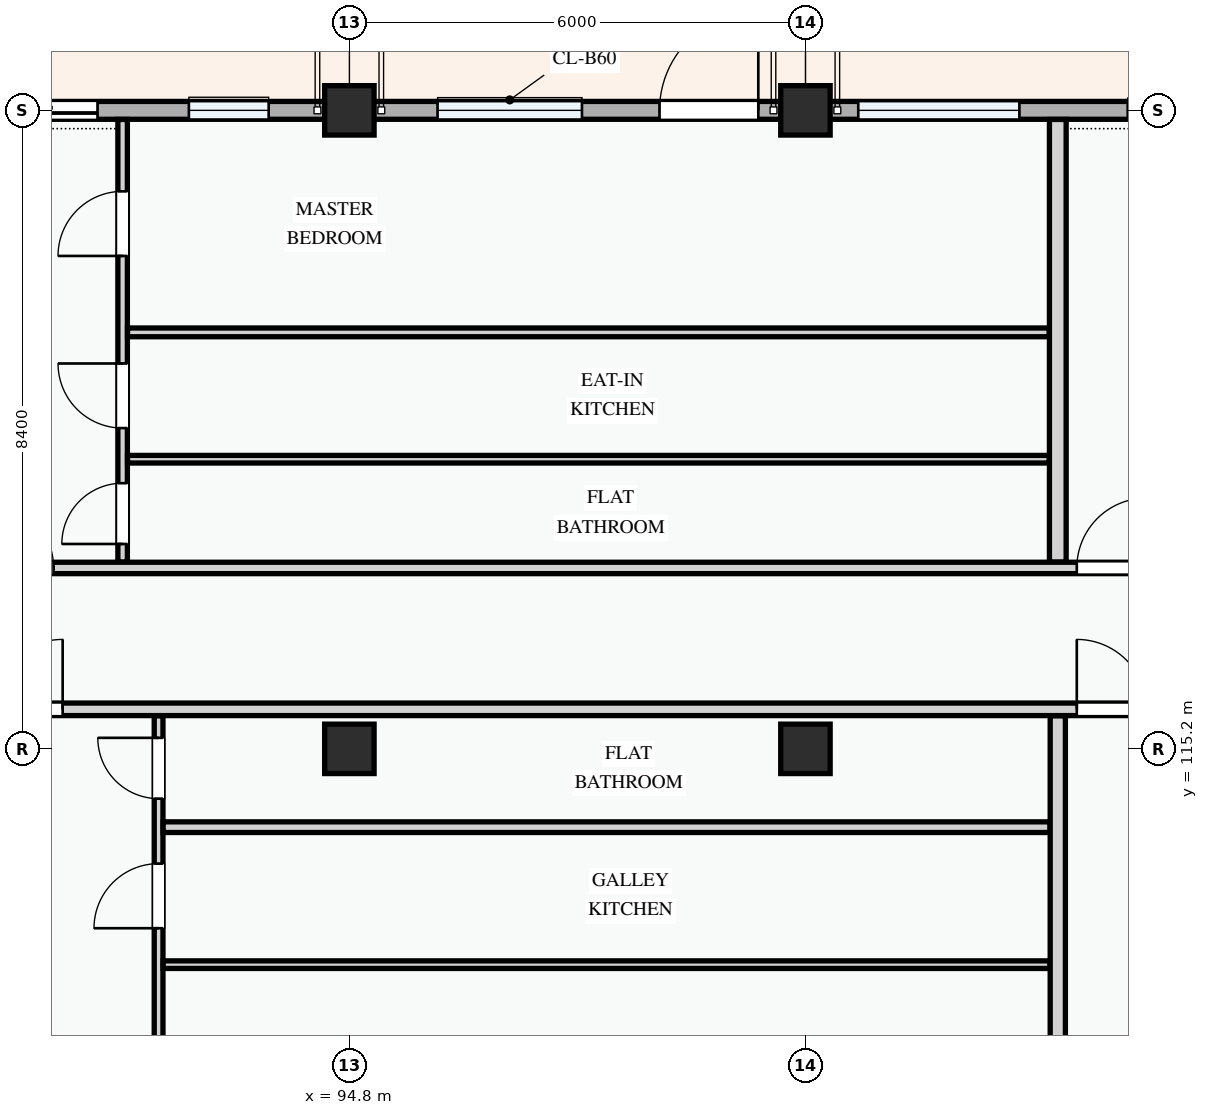
"""IFC4 building model, lengths in metres.
Left out: names, types, materials, properties, quantities, classifications, styles, units other than length and angle.
Written with IfcOpenShell. Run it as: python <this file> out.ifc"""

import sys

from ifc_helpers import new_model, si_unit, direction, frame, frame_2d, origin, origin_2d, place, context, subcontext, project, spatial, rectangle, extrude, element, fill, save


model = new_model("IFC4")
c1 = context("Model", 3, precision=1e-05, world=origin(), true_north=direction((0.0, 1.0)))
c2 = subcontext(c1, "Body", "Model", "MODEL_VIEW")
j1 = project(units=[si_unit("LENGTHUNIT", "METRE"), si_unit("PLANEANGLEUNIT", "RADIAN")], contexts=[c1])
p1 = place(None, origin())
s1 = spatial("IfcSite", under=j1, at=p1, CompositionType="ELEMENT")
p2 = place(p1, origin())
s2 = spatial("IfcBuilding", under=s1, at=p2, CompositionType="ELEMENT")
p3 = place(p2, frame((0.0, 0.0, 8.1)))
s3 = spatial("IfcBuildingStorey", under=s2, at=p3, CompositionType="ELEMENT", Elevation=8.1)
for number, where, z_axis, x_axis in (
    (1, (94.8, 115.2, 0.0), (0.0, 0.0, 1.0), (1.0, 0.0, 0.0)),
    (2, (94.8, 123.6, 0.0), (0.0, 0.0, 1.0), (1.0, 0.0, 0.0)),
    (3, (100.8, 115.2, 0.0), (0.0, 0.0, 1.0), (1.0, 0.0, 0.0)),
    (4, (100.8, 123.6, 0.0), (0.0, 0.0, 1.0), (1.0, 0.0, 0.0)),
):
    element("IfcColumn", number, at=place(p3, frame(where, z_axis=z_axis, x_axis=x_axis)), inside=s3, PredefinedType="COLUMN", context=c2, shape_type="SweptSolid", body=[
        extrude(rectangle(XDim=0.65, YDim=0.65, at=origin_2d()), origin(), (0.0, 0.0, 1.0), 3.3),
    ])
p4 = place(p3, frame((109.2, 123.6, 0.0), z_axis=(0.0, 0.0, 1.0), x_axis=(-1.0, 0.0, 0.0)))
e5 = element("IfcWall", 5, at=p4, inside=s3, PredefinedType="STANDARD", context=c2, shape_type="SweptSolid", body=[
    extrude(rectangle(XDim=8.4, YDim=0.235, at=frame_2d((4.2, 0.0))), origin(), (0.0, 0.0, 1.0), 2.345),
])
p5 = place(p4, frame((0.62, 0.0, 0.0)))
e6 = element("IfcOpeningElement", 6, at=p5, cuts=e5, PredefinedType="OPENING", context=c2, shape_type="SweptSolid", body=[
    extrude(rectangle(XDim=1.25, YDim=2.2, at=frame_2d((0.625, 1.1))), frame((0.0, 0.127, 0.0), z_axis=(0.0, -1.0, 0.0), x_axis=(1.0, 0.0, 0.0)), (0.0, 0.0, 1.0), 0.255),
])
p6 = place(p4, frame((2.84, 0.0, 0.78)))
e7 = element("IfcOpeningElement", 7, at=p6, cuts=e5, PredefinedType="OPENING", context=c2, shape_type="SweptSolid", body=[
    extrude(rectangle(XDim=1.32, YDim=1.35, at=frame_2d((0.66, 0.675))), frame((0.0, 0.127, 0.0), z_axis=(0.0, -1.0, 0.0), x_axis=(1.0, 0.0, 0.0)), (0.0, 0.0, 1.0), 0.255),
])
p7 = place(p4, frame((5.585, 0.0, 0.78)))
e8 = element("IfcOpeningElement", 8, at=p7, cuts=e5, PredefinedType="OPENING", context=c2, shape_type="SweptSolid", body=[
    extrude(rectangle(XDim=2.12, YDim=1.44, at=frame_2d((1.06, 0.72))), frame((0.0, 0.127, 0.0), z_axis=(0.0, -1.0, 0.0), x_axis=(1.0, 0.0, 0.0)), (0.0, 0.0, 1.0), 0.255),
])
p8 = place(p3, frame((100.8, 123.6, 0.0), z_axis=(0.0, 0.0, 1.0), x_axis=(-1.0, 0.0, 0.0)))
e9 = element("IfcWall", 9, at=p8, inside=s3, PredefinedType="STANDARD", context=c2, shape_type="SweptSolid", body=[
    extrude(rectangle(XDim=6.0, YDim=0.235, at=frame_2d((3.0, 0.0))), origin(), (0.0, 0.0, 1.0), 2.445),
])
p9 = place(p8, frame((0.62, 0.0, 0.0)))
e10 = element("IfcOpeningElement", 10, at=p9, cuts=e9, PredefinedType="OPENING", context=c2, shape_type="SweptSolid", body=[
    extrude(rectangle(XDim=1.3, YDim=2.15, at=frame_2d((0.65, 1.075))), frame((0.0, 0.127, 0.0), z_axis=(0.0, -1.0, 0.0), x_axis=(1.0, 0.0, 0.0)), (0.0, 0.0, 1.0), 0.255),
])
p10 = place(p8, frame((2.94, 0.0, 0.78)))
e11 = element("IfcOpeningElement", 11, at=p10, cuts=e9, PredefinedType="OPENING", context=c2, shape_type="SweptSolid", body=[
    extrude(rectangle(XDim=1.9, YDim=1.55, at=frame_2d((0.95, 0.775))), frame((0.0, 0.127, 0.0), z_axis=(0.0, -1.0, 0.0), x_axis=(1.0, 0.0, 0.0)), (0.0, 0.0, 1.0), 0.255),
])
p11 = place(p3, frame((94.8, 123.6, 0.0), z_axis=(0.0, 0.0, 1.0), x_axis=(-1.0, 0.0, 0.0)))
e12 = element("IfcWall", 12, at=p11, inside=s3, PredefinedType="STANDARD", context=c2, shape_type="SweptSolid", body=[
    extrude(rectangle(XDim=8.4, YDim=0.235, at=frame_2d((4.2, 0.0))), origin(), (0.0, 0.0, 1.0), 2.345),
])
p12 = place(p11, frame((3.313, 0.0, 0.0)))
e13 = element("IfcOpeningElement", 13, at=p12, cuts=e12, PredefinedType="OPENING", context=c2, shape_type="SweptSolid", body=[
    extrude(rectangle(XDim=1.4, YDim=2.2, at=frame_2d((0.7, 1.1))), frame((0.0, 0.127, 0.0), z_axis=(0.0, -1.0, 0.0), x_axis=(1.0, 0.0, 0.0)), (0.0, 0.0, 1.0), 0.255),
])
p13 = place(p11, frame((1.062, 0.0, 0.78)))
e14 = element("IfcOpeningElement", 14, at=p13, cuts=e12, PredefinedType="OPENING", context=c2, shape_type="SweptSolid", body=[
    extrude(rectangle(XDim=1.05, YDim=1.2, at=frame_2d((0.525, 0.6))), frame((0.0, 0.127, 0.0), z_axis=(0.0, -1.0, 0.0), x_axis=(1.0, 0.0, 0.0)), (0.0, 0.0, 1.0), 0.255),
])
p14 = place(p11, frame((5.727, 0.0, 0.78)))
e15 = element("IfcOpeningElement", 15, at=p14, cuts=e12, PredefinedType="OPENING", context=c2, shape_type="SweptSolid", body=[
    extrude(rectangle(XDim=1.52, YDim=1.42, at=frame_2d((0.76, 0.71))), frame((0.0, 0.127, 0.0), z_axis=(0.0, -1.0, 0.0), x_axis=(1.0, 0.0, 0.0)), (0.0, 0.0, 1.0), 0.255),
])
p15 = place(p3, frame((92.29, 109.32, 0.0), z_axis=(0.0, 0.0, 1.0), x_axis=(0.0, 1.0, 0.0)))
e16 = element("IfcWall", 16, at=p15, inside=s3, PredefinedType="PARTITIONING", context=c2, shape_type="SweptSolid", body=[
    extrude(rectangle(XDim=6.316, YDim=0.115, at=frame_2d((3.158, 0.0))), origin(), (0.0, 0.0, 1.0), 3.0),
])
p16 = place(p15, frame((1.066, 0.0, 0.0)))
e17 = element("IfcOpeningElement", 17, at=p16, cuts=e16, PredefinedType="OPENING", context=c2, shape_type="SweptSolid", body=[
    extrude(rectangle(XDim=0.85, YDim=2.1, at=frame_2d((0.425, 1.05))), frame((0.0, 0.067, 0.0), z_axis=(0.0, -1.0, 0.0), x_axis=(1.0, 0.0, 0.0)), (0.0, 0.0, 1.0), 0.135),
])
p17 = place(p15, frame((3.521, 0.0, 0.0)))
e18 = element("IfcOpeningElement", 18, at=p17, cuts=e16, PredefinedType="OPENING", context=c2, shape_type="SweptSolid", body=[
    extrude(rectangle(XDim=0.85, YDim=2.1, at=frame_2d((0.425, 1.05))), frame((0.0, 0.067, 0.0), z_axis=(0.0, -1.0, 0.0), x_axis=(1.0, 0.0, 0.0)), (0.0, 0.0, 1.0), 0.135),
])
p18 = place(p15, frame((5.225, 0.0, 0.0)))
e19 = element("IfcOpeningElement", 19, at=p18, cuts=e16, PredefinedType="OPENING", context=c2, shape_type="SweptSolid", body=[
    extrude(rectangle(XDim=0.8, YDim=2.1, at=frame_2d((0.4, 1.05))), frame((0.0, 0.067, 0.0), z_axis=(0.0, -1.0, 0.0), x_axis=(1.0, 0.0, 0.0)), (0.0, 0.0, 1.0), 0.135),
])
p19 = place(p3, frame((92.35, 112.361, 0.0), z_axis=(0.0, 0.0, 1.0), x_axis=(1.0, 0.0, 0.0)))
e20 = element("IfcWall", 20, at=p19, inside=s3, PredefinedType="PARTITIONING", context=c2, shape_type="SweptSolid", body=[
    extrude(rectangle(XDim=11.668, YDim=0.1, at=frame_2d((5.834, 0.0))), origin(), (0.0, 0.0, 1.0), 3.0),
])
p20 = place(p3, frame((92.35, 114.17, 0.0), z_axis=(0.0, 0.0, 1.0), x_axis=(1.0, 0.0, 0.0)))
e21 = element("IfcWall", 21, at=p20, inside=s3, PredefinedType="PARTITIONING", context=c2, shape_type="SweptSolid", body=[
    extrude(rectangle(XDim=11.668, YDim=0.14, at=frame_2d((5.834, 0.0))), origin(), (0.0, 0.0, 1.0), 3.0),
])
p21 = place(p3, frame((91.817, 117.657, 0.0), z_axis=(0.0, 0.0, 1.0), x_axis=(0.0, 1.0, 0.0)))
e22 = element("IfcWall", 22, at=p21, inside=s3, PredefinedType="PARTITIONING", context=c2, shape_type="SweptSolid", body=[
    extrude(rectangle(XDim=5.823, YDim=0.125, at=frame_2d((2.912, 0.0))), origin(), (0.0, 0.0, 1.0), 3.0),
])
p22 = place(p21, frame((0.238, 0.0, 0.0)))
e23 = element("IfcOpeningElement", 23, at=p22, cuts=e22, PredefinedType="OPENING", context=c2, shape_type="SweptSolid", body=[
    extrude(rectangle(XDim=0.8, YDim=2.1, at=frame_2d((0.4, 1.05))), frame((0.0, 0.073, 0.0), z_axis=(0.0, -1.0, 0.0), x_axis=(1.0, 0.0, 0.0)), (0.0, 0.0, 1.0), 0.145),
])
p23 = place(p21, frame((1.763, 0.0, 0.0)))
e24 = element("IfcOpeningElement", 24, at=p23, cuts=e22, PredefinedType="OPENING", context=c2, shape_type="SweptSolid", body=[
    extrude(rectangle(XDim=0.85, YDim=2.1, at=frame_2d((0.425, 1.05))), frame((0.0, 0.073, 0.0), z_axis=(0.0, -1.0, 0.0), x_axis=(1.0, 0.0, 0.0)), (0.0, 0.0, 1.0), 0.145),
])
p24 = place(p21, frame((4.028, 0.0, 0.0)))
e25 = element("IfcOpeningElement", 25, at=p24, cuts=e22, PredefinedType="OPENING", context=c2, shape_type="SweptSolid", body=[
    extrude(rectangle(XDim=0.85, YDim=2.1, at=frame_2d((0.425, 1.05))), frame((0.0, 0.073, 0.0), z_axis=(0.0, -1.0, 0.0), x_axis=(1.0, 0.0, 0.0)), (0.0, 0.0, 1.0), 0.145),
])
p25 = place(p3, frame((91.881, 120.679, 0.0), z_axis=(0.0, 0.0, 1.0), x_axis=(1.0, 0.0, 0.0)))
e26 = element("IfcWall", 26, at=p25, inside=s3, PredefinedType="PARTITIONING", context=c2, shape_type="SweptSolid", body=[
    extrude(rectangle(XDim=12.127, YDim=0.115, at=frame_2d((6.063, 0.0))), origin(), (0.0, 0.0, 1.0), 3.0),
])
p26 = place(p3, frame((91.881, 119.01, 0.0), z_axis=(0.0, 0.0, 1.0), x_axis=(1.0, 0.0, 0.0)))
e27 = element("IfcWall", 27, at=p26, inside=s3, PredefinedType="PARTITIONING", context=c2, shape_type="SweptSolid", body=[
    extrude(rectangle(XDim=12.127, YDim=0.1, at=frame_2d((6.063, 0.0))), origin(), (0.0, 0.0, 1.0), 3.0),
])
p27 = place(p3, frame((104.12, 109.32, 0.0), z_axis=(0.0, 0.0, 1.0), x_axis=(0.0, 1.0, 0.0)))
e28 = element("IfcWall", 28, at=p27, inside=s3, PredefinedType="PARTITIONING", context=c2, shape_type="SweptSolid", body=[
    extrude(rectangle(XDim=6.316, YDim=0.2, at=frame_2d((3.158, 0.0))), origin(), (0.0, 0.0, 1.0), 3.0),
])
p28 = place(p3, frame((104.12, 117.657, 0.0), z_axis=(0.0, 0.0, 1.0), x_axis=(0.0, 1.0, 0.0)))
e29 = element("IfcWall", 29, at=p28, inside=s3, PredefinedType="PARTITIONING", context=c2, shape_type="SweptSolid", body=[
    extrude(rectangle(XDim=5.823, YDim=0.22, at=frame_2d((2.912, 0.0))), origin(), (0.0, 0.0, 1.0), 3.0),
])
p29 = place(p3, frame((80.52, 115.72, 0.0), z_axis=(0.0, 0.0, 1.0), x_axis=(1.0, 0.0, 0.0)))
e30 = element("IfcWall", 30, at=p29, inside=s3, PredefinedType="PARTITIONING", context=c2, shape_type="SweptSolid", body=[
    extrude(rectangle(XDim=69.531, YDim=0.165, at=frame_2d((34.765, 0.0))), origin(), (0.0, 0.0, 1.0), 3.0),
])
p30 = place(p29, frame((9.588, 0.0, 0.0)))
e31 = element("IfcOpeningElement", 31, at=p30, cuts=e30, PredefinedType="OPENING", context=c2, shape_type="SweptSolid", body=[
    extrude(rectangle(XDim=0.92, YDim=2.1, at=frame_2d((0.46, 1.05))), frame((0.0, 0.093, 0.0), z_axis=(0.0, -1.0, 0.0), x_axis=(1.0, 0.0, 0.0)), (0.0, 0.0, 1.0), 0.185),
])
p31 = place(p29, frame((23.851, 0.0, 0.0)))
e32 = element("IfcOpeningElement", 32, at=p31, cuts=e30, PredefinedType="OPENING", context=c2, shape_type="SweptSolid", body=[
    extrude(rectangle(XDim=0.92, YDim=2.1, at=frame_2d((0.46, 1.05))), frame((0.0, 0.093, 0.0), z_axis=(0.0, -1.0, 0.0), x_axis=(1.0, 0.0, 0.0)), (0.0, 0.0, 1.0), 0.185),
])
p32 = place(p29, frame((52.798, 0.0, 0.0)))
e33 = element("IfcOpeningElement", 33, at=p32, cuts=e30, PredefinedType="OPENING", context=c2, shape_type="SweptSolid", body=[
    extrude(rectangle(XDim=0.96, YDim=2.12, at=frame_2d((0.48, 1.06))), frame((0.0, 0.093, 0.0), z_axis=(0.0, -1.0, 0.0), x_axis=(1.0, 0.0, 0.0)), (0.0, 0.0, 1.0), 0.185),
])
p33 = place(p3, frame((80.52, 117.58, 0.0), z_axis=(0.0, 0.0, 1.0), x_axis=(1.0, 0.0, 0.0)))
e34 = element("IfcWall", 34, at=p33, inside=s3, PredefinedType="PARTITIONING", context=c2, shape_type="SweptSolid", body=[
    extrude(rectangle(XDim=72.021, YDim=0.15, at=frame_2d((36.01, 0.0))), origin(), (0.0, 0.0, 1.0), 3.0),
])
p34 = place(p33, frame((9.469, 0.0, 0.0)))
e35 = element("IfcOpeningElement", 35, at=p34, cuts=e34, PredefinedType="OPENING", context=c2, shape_type="SweptSolid", body=[
    extrude(rectangle(XDim=0.92, YDim=2.1, at=frame_2d((0.46, 1.05))), frame((0.0, 0.085, 0.0), z_axis=(0.0, -1.0, 0.0), x_axis=(1.0, 0.0, 0.0)), (0.0, 0.0, 1.0), 0.17),
])
p35 = place(p33, frame((23.851, 0.0, 0.0)))
e36 = element("IfcOpeningElement", 36, at=p35, cuts=e34, PredefinedType="OPENING", context=c2, shape_type="SweptSolid", body=[
    extrude(rectangle(XDim=0.92, YDim=2.1, at=frame_2d((0.46, 1.05))), frame((0.0, 0.085, 0.0), z_axis=(0.0, -1.0, 0.0), x_axis=(1.0, 0.0, 0.0)), (0.0, 0.0, 1.0), 0.17),
])
p36 = place(p33, frame((52.775, 0.0, 0.0)))
e37 = element("IfcOpeningElement", 37, at=p36, cuts=e34, PredefinedType="OPENING", context=c2, shape_type="SweptSolid", body=[
    extrude(rectangle(XDim=0.92, YDim=2.1, at=frame_2d((0.46, 1.05))), frame((0.0, 0.085, 0.0), z_axis=(0.0, -1.0, 0.0), x_axis=(1.0, 0.0, 0.0)), (0.0, 0.0, 1.0), 0.17),
])
p37 = place(p6, origin())
e38 = element("IfcWindow", 38, at=p37, inside=s3, PartitioningType="SINGLE_PANEL", PredefinedType="WINDOW", context=c2, shape_type="SweptSolid", body=[
    extrude(rectangle(XDim=1.32, YDim=1.35, at=frame_2d((0.66, 0.675))), frame((0.0, 0.03, 0.0), z_axis=(0.0, -1.0, 0.0), x_axis=(1.0, 0.0, 0.0)), (0.0, 0.0, 1.0), 0.06),
])
fill(e7, e38)
p38 = place(p7, origin())
e39 = element("IfcWindow", 39, at=p38, inside=s3, PartitioningType="DOUBLE_PANEL_VERTICAL", PredefinedType="WINDOW", context=c2, shape_type="SweptSolid", body=[
    extrude(rectangle(XDim=2.12, YDim=1.44, at=frame_2d((1.06, 0.72))), frame((0.0, 0.03, 0.0), z_axis=(0.0, -1.0, 0.0), x_axis=(1.0, 0.0, 0.0)), (0.0, 0.0, 1.0), 0.06),
])
fill(e8, e39)
p39 = place(p9, frame((1.3, 0.0, 0.0), z_axis=(0.0, 0.0, 1.0), x_axis=(-1.0, 0.0, 0.0)))
e40 = element("IfcDoor", 40, at=p39, inside=s3, OperationType="SINGLE_SWING_RIGHT", PredefinedType="DOOR", context=c2, shape_type="SweptSolid", body=[
    extrude(rectangle(XDim=1.3, YDim=2.15, at=frame_2d((0.65, 1.075))), frame((0.0, 0.025, 0.0), z_axis=(0.0, -1.0, 0.0), x_axis=(1.0, 0.0, 0.0)), (0.0, 0.0, 1.0), 0.05),
])
fill(e10, e40)
p40 = place(p10, origin())
e41 = element("IfcWindow", 41, at=p40, inside=s3, PartitioningType="DOUBLE_PANEL_VERTICAL", PredefinedType="WINDOW", context=c2, shape_type="SweptSolid", body=[
    extrude(rectangle(XDim=1.9, YDim=1.55, at=frame_2d((0.95, 0.775))), frame((0.0, 0.03, 0.0), z_axis=(0.0, -1.0, 0.0), x_axis=(1.0, 0.0, 0.0)), (0.0, 0.0, 1.0), 0.06),
])
fill(e11, e41)
p41 = place(p12, frame((1.4, 0.0, 0.0), z_axis=(0.0, 0.0, 1.0), x_axis=(-1.0, 0.0, 0.0)))
e42 = element("IfcDoor", 42, at=p41, inside=s3, OperationType="SLIDING_TO_LEFT", PredefinedType="DOOR", context=c2, shape_type="SweptSolid", body=[
    extrude(rectangle(XDim=1.4, YDim=2.2, at=frame_2d((0.7, 1.1))), frame((0.0, 0.025, 0.0), z_axis=(0.0, -1.0, 0.0), x_axis=(1.0, 0.0, 0.0)), (0.0, 0.0, 1.0), 0.05),
])
fill(e13, e42)
p42 = place(p13, origin())
e43 = element("IfcWindow", 43, at=p42, inside=s3, PartitioningType="SINGLE_PANEL", PredefinedType="WINDOW", context=c2, shape_type="SweptSolid", body=[
    extrude(rectangle(XDim=1.05, YDim=1.2, at=frame_2d((0.525, 0.6))), frame((0.0, 0.03, 0.0), z_axis=(0.0, -1.0, 0.0), x_axis=(1.0, 0.0, 0.0)), (0.0, 0.0, 1.0), 0.06),
])
fill(e14, e43)
p43 = place(p17, origin())
e44 = element("IfcDoor", 44, at=p43, inside=s3, OperationType="SINGLE_SWING_LEFT", PredefinedType="DOOR", context=c2, shape_type="SweptSolid", body=[
    extrude(rectangle(XDim=0.85, YDim=2.1, at=frame_2d((0.425, 1.05))), frame((0.0, 0.025, 0.0), z_axis=(0.0, -1.0, 0.0), x_axis=(1.0, 0.0, 0.0)), (0.0, 0.0, 1.0), 0.05),
])
fill(e18, e44)
p44 = place(p18, origin())
e45 = element("IfcDoor", 45, at=p44, inside=s3, OperationType="SINGLE_SWING_RIGHT", PredefinedType="DOOR", context=c2, shape_type="SweptSolid", body=[
    extrude(rectangle(XDim=0.8, YDim=2.1, at=frame_2d((0.4, 1.05))), frame((0.0, 0.025, 0.0), z_axis=(0.0, -1.0, 0.0), x_axis=(1.0, 0.0, 0.0)), (0.0, 0.0, 1.0), 0.05),
])
fill(e19, e45)
p45 = place(p22, origin())
e46 = element("IfcDoor", 46, at=p45, inside=s3, OperationType="SINGLE_SWING_LEFT", PredefinedType="DOOR", context=c2, shape_type="SweptSolid", body=[
    extrude(rectangle(XDim=0.8, YDim=2.1, at=frame_2d((0.4, 1.05))), frame((0.0, 0.025, 0.0), z_axis=(0.0, -1.0, 0.0), x_axis=(1.0, 0.0, 0.0)), (0.0, 0.0, 1.0), 0.05),
])
fill(e23, e46)
p46 = place(p23, origin())
e47 = element("IfcDoor", 47, at=p46, inside=s3, OperationType="SINGLE_SWING_RIGHT", PredefinedType="DOOR", context=c2, shape_type="SweptSolid", body=[
    extrude(rectangle(XDim=0.85, YDim=2.1, at=frame_2d((0.425, 1.05))), frame((0.0, 0.025, 0.0), z_axis=(0.0, -1.0, 0.0), x_axis=(1.0, 0.0, 0.0)), (0.0, 0.0, 1.0), 0.05),
])
fill(e24, e47)
p47 = place(p24, origin())
e48 = element("IfcDoor", 48, at=p47, inside=s3, OperationType="SINGLE_SWING_LEFT", PredefinedType="DOOR", context=c2, shape_type="SweptSolid", body=[
    extrude(rectangle(XDim=0.85, YDim=2.1, at=frame_2d((0.425, 1.05))), frame((0.0, 0.025, 0.0), z_axis=(0.0, -1.0, 0.0), x_axis=(1.0, 0.0, 0.0)), (0.0, 0.0, 1.0), 0.05),
])
fill(e25, e48)
p48 = place(p30, origin())
e49 = element("IfcDoor", 49, at=p48, inside=s3, OperationType="SINGLE_SWING_RIGHT", PredefinedType="DOOR", context=c2, shape_type="SweptSolid", body=[
    extrude(rectangle(XDim=0.92, YDim=2.1, at=frame_2d((0.46, 1.05))), frame((0.0, 0.025, 0.0), z_axis=(0.0, -1.0, 0.0), x_axis=(1.0, 0.0, 0.0)), (0.0, 0.0, 1.0), 0.05),
])
fill(e31, e49)
p49 = place(p31, origin())
e50 = element("IfcDoor", 50, at=p49, inside=s3, OperationType="SINGLE_SWING_LEFT", PredefinedType="DOOR", context=c2, shape_type="SweptSolid", body=[
    extrude(rectangle(XDim=0.92, YDim=2.1, at=frame_2d((0.46, 1.05))), frame((0.0, 0.025, 0.0), z_axis=(0.0, -1.0, 0.0), x_axis=(1.0, 0.0, 0.0)), (0.0, 0.0, 1.0), 0.05),
])
fill(e32, e50)
p50 = place(p34, origin())
e51 = element("IfcDoor", 51, at=p50, inside=s3, OperationType="SINGLE_SWING_LEFT", PredefinedType="DOOR", context=c2, shape_type="SweptSolid", body=[
    extrude(rectangle(XDim=0.92, YDim=2.1, at=frame_2d((0.46, 1.05))), frame((0.0, 0.025, 0.0), z_axis=(0.0, -1.0, 0.0), x_axis=(1.0, 0.0, 0.0)), (0.0, 0.0, 1.0), 0.05),
])
fill(e35, e51)
p51 = place(p35, origin())
e52 = element("IfcDoor", 52, at=p51, inside=s3, OperationType="SINGLE_SWING_RIGHT", PredefinedType="DOOR", context=c2, shape_type="SweptSolid", body=[
    extrude(rectangle(XDim=0.92, YDim=2.1, at=frame_2d((0.46, 1.05))), frame((0.0, 0.025, 0.0), z_axis=(0.0, -1.0, 0.0), x_axis=(1.0, 0.0, 0.0)), (0.0, 0.0, 1.0), 0.05),
])
fill(e36, e52)
save(model, sys.argv[1])
